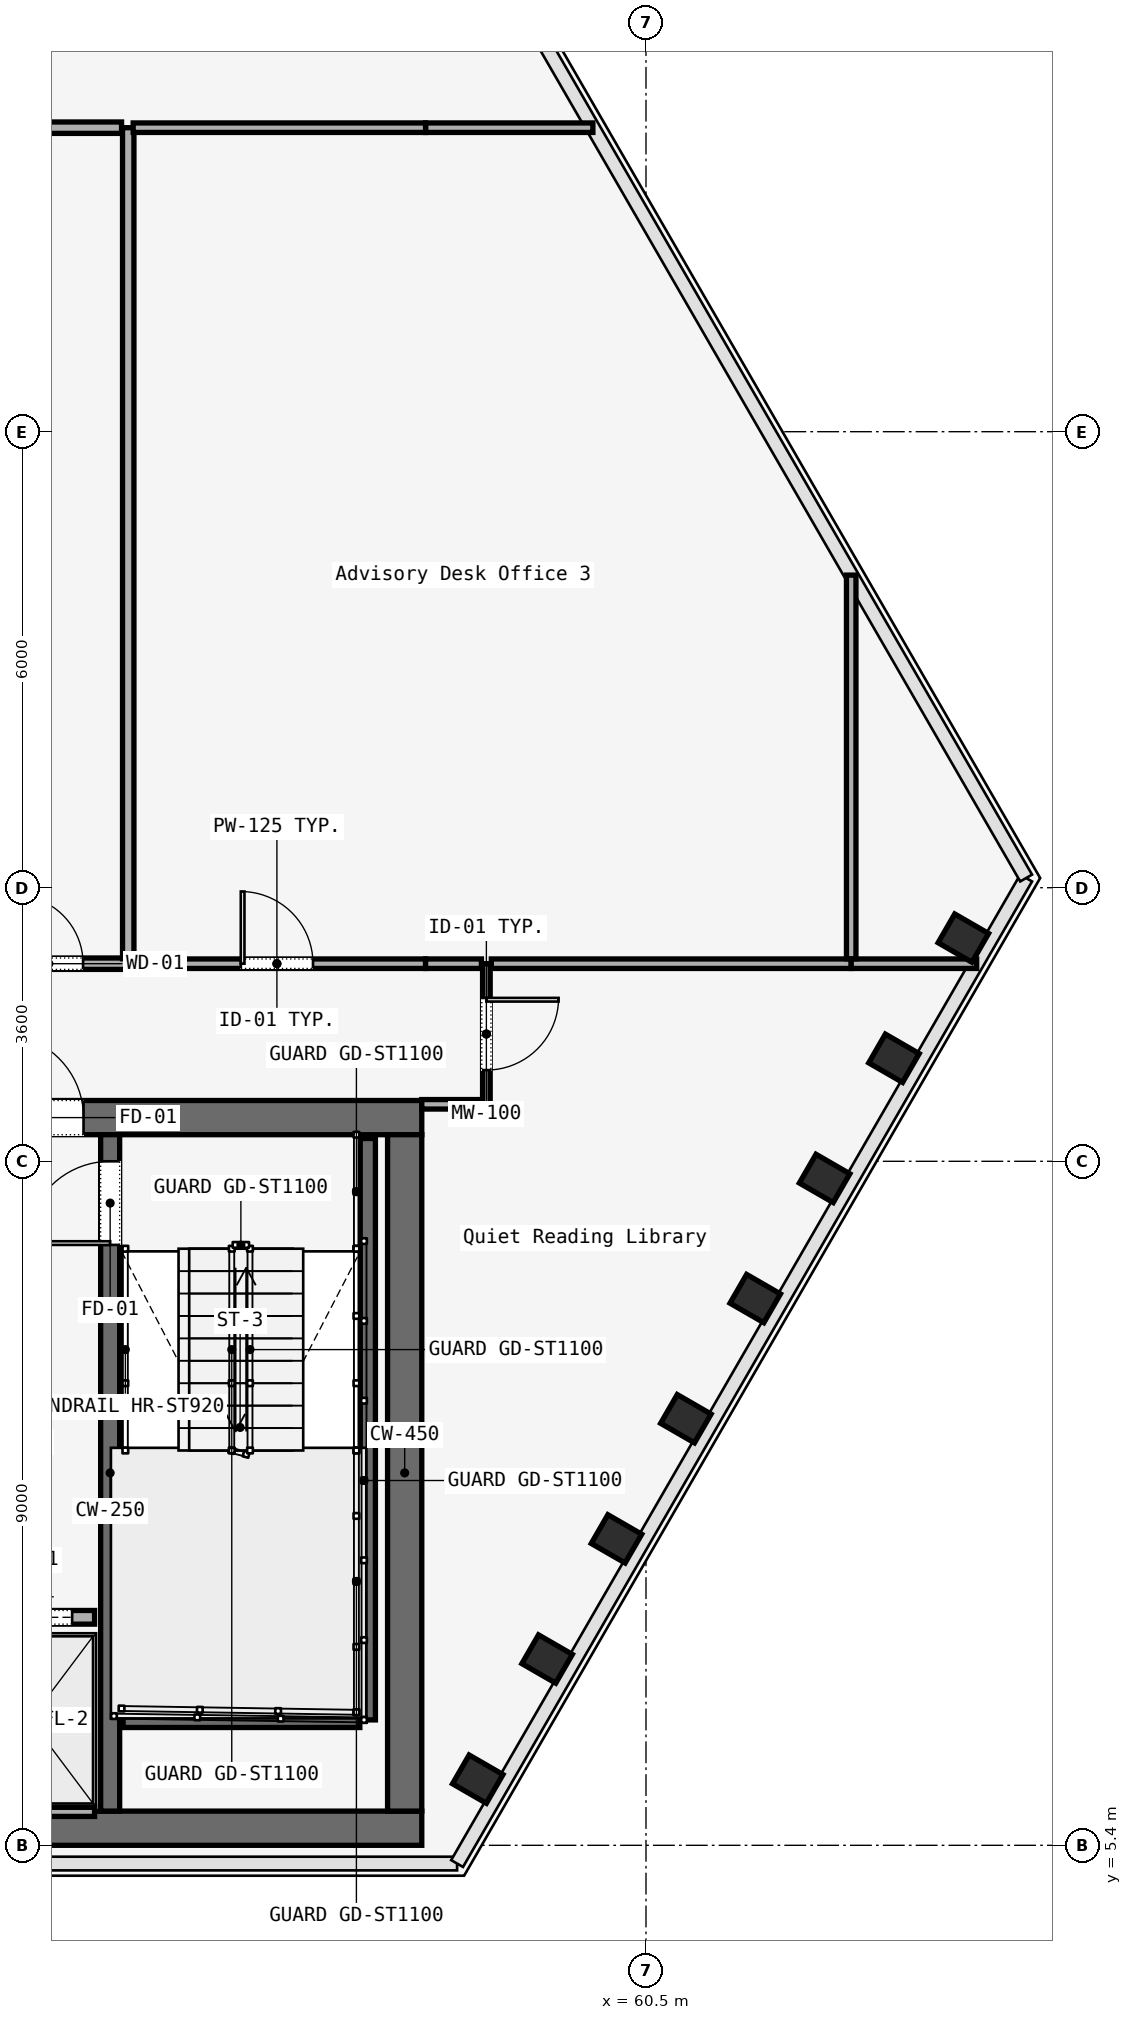
"""IFC4 building model, lengths in metres.
Left out: names, types, materials, properties, quantities, classifications, styles, units other than length and angle.
Written with IfcOpenShell. Run it as: python <this file> out.ifc"""

import sys

from ifc_helpers import new_model, si_unit, direction, frame, frame_2d, origin, origin_2d, place, context, subcontext, project, spatial, rectangle, i_section, extrude, element, fill, save


model = new_model("IFC4")
c1 = context("Model", 3, precision=1e-05, world=origin(), true_north=direction((0.0, 1.0)))
c2 = subcontext(c1, "Body", "Model", "MODEL_VIEW")
j1 = project(units=[si_unit("LENGTHUNIT", "METRE"), si_unit("PLANEANGLEUNIT", "RADIAN")], contexts=[c1])
p1 = place(None, origin())
s1 = spatial("IfcSite", under=j1, at=p1, CompositionType="ELEMENT")
p2 = place(p1, origin())
s2 = spatial("IfcBuilding", under=s1, at=p2, CompositionType="ELEMENT")
p3 = place(p2, frame((0.0, 0.0, 77.8)))
s3 = spatial("IfcBuildingStorey", under=s2, at=p3, CompositionType="ELEMENT", Elevation=77.8)
p4 = place(p3, frame((26.45, 14.975, 0.0), z_axis=(0.0, 0.0, 1.0), x_axis=(1.0, 0.0, 0.0)))
e1 = element("IfcWall", 1, at=p4, inside=s3, PredefinedType="SOLIDWALL", context=c2, shape_type="SweptSolid", body=[
    extrude(rectangle(XDim=31.1, YDim=0.45, at=frame_2d((15.55, 0.0))), origin(), (0.0, 0.0, 1.0), 3.58),
])
p5 = place(p4, frame((1.65, 0.0, 0.0)))
e2 = element("IfcOpeningElement", 2, at=p5, cuts=e1, PredefinedType="OPENING", context=c2, shape_type="SweptSolid", body=[
    extrude(rectangle(XDim=1.1, YDim=2.2, at=frame_2d((0.55, 1.1))), frame((0.0, 0.225, 0.0), z_axis=(0.0, -1.0, 0.0), x_axis=(1.0, 0.0, 0.0)), (0.0, 0.0, 1.0), 0.45),
])
p6 = place(p4, frame((13.65, 0.0, 0.0)))
e3 = element("IfcOpeningElement", 3, at=p6, cuts=e1, PredefinedType="OPENING", context=c2, shape_type="SweptSolid", body=[
    extrude(rectangle(XDim=1.1, YDim=2.2, at=frame_2d((0.55, 1.1))), frame((0.0, 0.225, 0.0), z_axis=(0.0, -1.0, 0.0), x_axis=(1.0, 0.0, 0.0)), (0.0, 0.0, 1.0), 0.45),
])
p7 = place(p4, frame((25.55, 0.0, 0.0)))
e4 = element("IfcOpeningElement", 4, at=p7, cuts=e1, PredefinedType="OPENING", context=c2, shape_type="SweptSolid", body=[
    extrude(rectangle(XDim=1.1, YDim=2.2, at=frame_2d((0.55, 1.1))), frame((0.0, 0.225, 0.0), z_axis=(0.0, -1.0, 0.0), x_axis=(1.0, 0.0, 0.0)), (0.0, 0.0, 1.0), 0.45),
])
p8 = place(p4, frame((10.7, 0.0, 0.0)))
e5 = element("IfcOpeningElement", 5, at=p8, cuts=e1, PredefinedType="OPENING", context=c2, shape_type="SweptSolid", body=[
    extrude(rectangle(XDim=1.4, YDim=2.2, at=frame_2d((0.7, 1.1))), frame((0.0, 0.225, 0.0), z_axis=(0.0, -1.0, 0.0), x_axis=(1.0, 0.0, 0.0)), (0.0, 0.0, 1.0), 0.45),
])
p9 = place(p4, frame((19.35, 0.0, 0.0)))
e6 = element("IfcOpeningElement", 6, at=p9, cuts=e1, PredefinedType="OPENING", context=c2, shape_type="SweptSolid", body=[
    extrude(rectangle(XDim=1.1, YDim=2.2, at=frame_2d((0.55, 1.1))), frame((0.0, 0.225, 0.0), z_axis=(0.0, -1.0, 0.0), x_axis=(1.0, 0.0, 0.0)), (0.0, 0.0, 1.0), 0.45),
])
p10 = place(p4, frame((21.4, 0.0, 0.0)))
e7 = element("IfcOpeningElement", 7, at=p10, cuts=e1, PredefinedType="OPENING", context=c2, shape_type="SweptSolid", body=[
    extrude(rectangle(XDim=0.9, YDim=2.1, at=frame_2d((0.45, 1.05))), frame((0.0, 0.225, 0.0), z_axis=(0.0, -1.0, 0.0), x_axis=(1.0, 0.0, 0.0)), (0.0, 0.0, 1.0), 0.45),
])
p11 = place(p4, frame((23.35, 0.0, 0.0)))
e8 = element("IfcOpeningElement", 8, at=p11, cuts=e1, PredefinedType="OPENING", context=c2, shape_type="SweptSolid", body=[
    extrude(rectangle(XDim=1.3, YDim=2.3, at=frame_2d((0.65, 1.15))), frame((0.0, 0.225, 0.0), z_axis=(0.0, -1.0, 0.0), x_axis=(1.0, 0.0, 0.0)), (0.0, 0.0, 1.0), 0.45),
])
p12 = place(p3, frame((26.45, 5.625, 0.0), z_axis=(0.0, 0.0, 1.0), x_axis=(1.0, 0.0, 0.0)))
e9 = element("IfcWall", 9, at=p12, inside=s3, PredefinedType="SOLIDWALL", context=c2, shape_type="SweptSolid", body=[
    extrude(rectangle(XDim=31.1, YDim=0.45, at=frame_2d((15.55, 0.0))), origin(), (0.0, 0.0, 1.0), 3.58),
])
p13 = place(p3, frame((57.325, 5.85, 0.0), z_axis=(0.0, 0.0, 1.0), x_axis=(0.0, 1.0, 0.0)))
e10 = element("IfcWall", 10, at=p13, inside=s3, PredefinedType="SOLIDWALL", context=c2, shape_type="SweptSolid", body=[
    extrude(rectangle(XDim=8.9, YDim=0.45, at=frame_2d((4.45, 0.0))), origin(), (0.0, 0.0, 1.0), 3.58),
])
p14 = place(p3, frame((53.45, 5.85, 0.0), z_axis=(0.0, 0.0, 1.0), x_axis=(0.0, 1.0, 0.0)))
e11 = element("IfcWall", 11, at=p14, inside=s3, PredefinedType="SOLIDWALL", context=c2, shape_type="SweptSolid", body=[
    extrude(rectangle(XDim=8.9, YDim=0.25, at=frame_2d((4.45, 0.0))), origin(), (0.0, 0.0, 1.0), 3.58),
])
p15 = place(p14, frame((7.45, 0.0, 0.0)))
e12 = element("IfcOpeningElement", 12, at=p15, cuts=e11, PredefinedType="OPENING", context=c2, shape_type="SweptSolid", body=[
    extrude(rectangle(XDim=1.1, YDim=2.2, at=frame_2d((0.55, 1.1))), frame((0.0, 0.125, 0.0), z_axis=(0.0, -1.0, 0.0), x_axis=(1.0, 0.0, 0.0)), (0.0, 0.0, 1.0), 0.25),
])
p16 = place(p3, frame((58.287, 6.271, 0.0), z_axis=(0.077036980807, -0.008363237987, 0.996993159374), x_axis=(-0.804414378603, 0.590266064903, 0.067107973603)))
e13 = element("IfcColumn", 13, at=p16, inside=s3, PredefinedType="COLUMN", context=c2, shape_type="SweptSolid", body=[
    extrude(i_section(OverallWidth=0.437, OverallDepth=0.514, WebThickness=0.061, FlangeThickness=0.077, FilletRadius=0.015, at=origin_2d()), origin(), (0.0, 0.0, 1.0), 3.591),
])
p17 = place(p3, frame((59.199, 7.851, 0.0), z_axis=(0.067477832085, -0.025032098999, 0.99740670551), x_axis=(-0.635947109951, 0.769211528445, 0.062328948751)))
e14 = element("IfcColumn", 14, at=p17, inside=s3, PredefinedType="COLUMN", context=c2, shape_type="SweptSolid", body=[
    extrude(i_section(OverallWidth=0.437, OverallDepth=0.514, WebThickness=0.061, FlangeThickness=0.077, FilletRadius=0.015, at=origin_2d()), origin(), (0.0, 0.0, 1.0), 3.589),
])
p18 = place(p3, frame((60.112, 9.432, 0.0), z_axis=(0.057889342979, -0.041699373967, 0.997451746292), x_axis=(-0.40866877957, 0.910588995233, 0.061786004603)))
e15 = element("IfcColumn", 15, at=p18, inside=s3, PredefinedType="COLUMN", context=c2, shape_type="SweptSolid", body=[
    extrude(i_section(OverallWidth=0.437, OverallDepth=0.514, WebThickness=0.061, FlangeThickness=0.077, FilletRadius=0.015, at=origin_2d()), origin(), (0.0, 0.0, 1.0), 3.589),
])
p19 = place(p3, frame((61.025, 11.013, 0.0), z_axis=(0.048214100692, -0.058414545126, 0.99712744492), x_axis=(-0.164075575958, 0.984264477381, 0.065594542005)))
e16 = element("IfcColumn", 16, at=p19, inside=s3, PredefinedType="COLUMN", context=c2, shape_type="SweptSolid", body=[
    extrude(i_section(OverallWidth=0.437, OverallDepth=0.514, WebThickness=0.061, FlangeThickness=0.077, FilletRadius=0.015, at=origin_2d()), origin(), (0.0, 0.0, 1.0), 3.59),
])
p20 = place(p3, frame((61.938, 12.594, 0.0), z_axis=(0.038463129427, -0.075023489201, 0.996439693982), x_axis=(0.051243793832, 0.996013615068, 0.07301336996)))
e17 = element("IfcColumn", 17, at=p20, inside=s3, PredefinedType="COLUMN", context=c2, shape_type="SweptSolid", body=[
    extrude(i_section(OverallWidth=0.437, OverallDepth=0.514, WebThickness=0.061, FlangeThickness=0.077, FilletRadius=0.015, at=origin_2d()), origin(), (0.0, 0.0, 1.0), 3.593),
])
p21 = place(p3, frame((62.85, 14.175, 0.0), z_axis=(0.02891844144, -0.09157506456, 0.995378185061), x_axis=(0.217209229225, 0.972575677884, 0.083166709256)))
e18 = element("IfcColumn", 18, at=p21, inside=s3, PredefinedType="COLUMN", context=c2, shape_type="SweptSolid", body=[
    extrude(i_section(OverallWidth=0.437, OverallDepth=0.514, WebThickness=0.061, FlangeThickness=0.077, FilletRadius=0.015, at=origin_2d()), origin(), (0.0, 0.0, 1.0), 3.596),
])
p22 = place(p3, frame((63.763, 15.756, 0.0), z_axis=(0.019251328517, -0.108119256986, 0.993951514219), x_axis=(0.341362230089, 0.935107767764, 0.095106732336)))
e19 = element("IfcColumn", 19, at=p22, inside=s3, PredefinedType="COLUMN", context=c2, shape_type="SweptSolid", body=[
    extrude(i_section(OverallWidth=0.437, OverallDepth=0.514, WebThickness=0.061, FlangeThickness=0.077, FilletRadius=0.015, at=origin_2d()), origin(), (0.0, 0.0, 1.0), 3.602),
])
p23 = place(p3, frame((64.676, 17.337, 0.0), z_axis=(0.009608437026, -0.124503691039, 0.992172620493), x_axis=(0.432402826745, 0.895171870126, 0.108143970513)))
e20 = element("IfcColumn", 20, at=p23, inside=s3, PredefinedType="COLUMN", context=c2, shape_type="SweptSolid", body=[
    extrude(i_section(OverallWidth=0.437, OverallDepth=0.514, WebThickness=0.061, FlangeThickness=0.077, FilletRadius=0.015, at=origin_2d()), origin(), (0.0, 0.0, 1.0), 3.608),
])
p24 = place(p3, frame((56.84, 14.7, 0.0), z_axis=(0.0, 0.0, 1.0), x_axis=(0.0, -1.0, 0.0)))
e21 = element("IfcWall", 21, at=p24, inside=s3, PredefinedType="SOLIDWALL", context=c2, shape_type="SweptSolid", body=[
    extrude(rectangle(XDim=7.65, YDim=0.2, at=frame_2d((3.825, 0.0))), origin(), (0.0, 0.0, 1.0), 3.8),
])
p25 = place(p3, frame((53.62, 7.05, 0.0), z_axis=(0.0, 0.0, 1.0), x_axis=(1.0, 0.0, 0.0)))
e22 = element("IfcWall", 22, at=p25, inside=s3, PredefinedType="SOLIDWALL", context=c2, shape_type="SweptSolid", body=[
    extrude(rectangle(XDim=3.115, YDim=0.2, at=frame_2d((1.558, 0.0))), origin(), (0.0, 0.0, 1.0), 3.8),
])
p26 = place(p3, frame((51.555, 8.4, 0.0), z_axis=(0.0, 0.0, 1.0), x_axis=(1.0, 0.0, 0.0)))
e23 = element("IfcWall", 23, at=p26, inside=s3, PredefinedType="SOLIDWALL", context=c2, shape_type="SweptSolid", body=[
    extrude(rectangle(XDim=1.69, YDim=0.18, at=frame_2d((0.845, 0.0))), origin(), (0.0, 0.0, 1.0), 2.95),
])
p27 = place(p26, frame((0.295, 0.0, 0.0)))
e24 = element("IfcOpeningElement", 24, at=p27, cuts=e23, PredefinedType="OPENING", context=c2, shape_type="SweptSolid", body=[
    extrude(rectangle(XDim=1.1, YDim=2.2, at=frame_2d((0.55, 1.1))), frame((0.0, 0.09, 0.0), z_axis=(0.0, -1.0, 0.0), x_axis=(1.0, 0.0, 0.0)), (0.0, 0.0, 1.0), 0.18),
])
p28 = place(p3, frame((51.555, 5.84, 0.0), z_axis=(0.0, 0.0, 1.0), x_axis=(1.0, 0.0, 0.0)))
e25 = element("IfcWall", 25, at=p28, inside=s3, PredefinedType="SOLIDWALL", context=c2, shape_type="SweptSolid", body=[
    extrude(rectangle(XDim=1.69, YDim=0.12, at=frame_2d((0.845, 0.0))), origin(), (0.0, 0.0, 1.0), 2.95),
])
p29 = place(p3, frame((58.4, 17.0, 0.0), z_axis=(0.0, 0.0, 1.0), x_axis=(0.0, -1.0, 0.0)))
e26 = element("IfcWall", 26, at=p29, inside=s3, PredefinedType="MOVABLE", context=c2, shape_type="SweptSolid", body=[
    extrude(rectangle(XDim=1.85, YDim=0.1, at=frame_2d((0.925, 0.0))), origin(), (0.0, 0.0, 1.0), 2.95),
])
p30 = place(p29, frame((0.45, 0.0, 0.0)))
e27 = element("IfcOpeningElement", 27, at=p30, cuts=e26, PredefinedType="OPENING", context=c2, shape_type="SweptSolid", body=[
    extrude(rectangle(XDim=0.95, YDim=2.2, at=frame_2d((0.475, 1.1))), frame((0.0, 0.05, 0.0), z_axis=(0.0, -1.0, 0.0), x_axis=(1.0, 0.0, 0.0)), (0.0, 0.0, 1.0), 0.1),
])
p31 = place(p3, frame((58.335, 15.15, 0.0), z_axis=(0.0, 0.0, 1.0), x_axis=(-1.0, 0.0, 0.0)))
e28 = element("IfcWall", 28, at=p31, inside=s3, PredefinedType="PARTITIONING", context=c2, shape_type="SweptSolid", body=[
    extrude(rectangle(XDim=0.785, YDim=0.125, at=frame_2d((0.393, 0.0))), origin(), (0.0, 0.0, 1.0), 2.95),
])
p32 = place(p3, frame((51.6, 17.0, 0.0), z_axis=(0.0, 0.0, 1.0), x_axis=(1.0, 0.0, 0.0)))
e29 = element("IfcWall", 29, at=p32, inside=s3, PredefinedType="PARTITIONING", context=c2, shape_type="SweptSolid", body=[
    extrude(rectangle(XDim=2.088, YDim=0.15, at=frame_2d((1.044, 0.0))), origin(), (0.0, 0.0, 1.0), 2.95),
])
p33 = place(p32, frame((0.594, 0.0, 0.0)))
e30 = element("IfcOpeningElement", 30, at=p33, cuts=e29, PredefinedType="OPENING", context=c2, shape_type="SweptSolid", body=[
    extrude(rectangle(XDim=0.9, YDim=2.15, at=frame_2d((0.45, 1.075))), frame((0.0, 0.075, 0.0), z_axis=(0.0, -1.0, 0.0), x_axis=(1.0, 0.0, 0.0)), (0.0, 0.0, 1.0), 0.15),
])
p34 = place(p3, frame((53.688, 17.0, 0.0), z_axis=(0.0, 0.0, 1.0), x_axis=(1.0, 0.0, 0.0)))
e31 = element("IfcWall", 31, at=p34, inside=s3, PredefinedType="PARTITIONING", context=c2, shape_type="SweptSolid", body=[
    extrude(rectangle(XDim=3.912, YDim=0.125, at=frame_2d((1.956, 0.0))), origin(), (0.0, 0.0, 1.0), 2.95),
])
p35 = place(p34, frame((1.481, 0.0, 0.0)))
e32 = element("IfcOpeningElement", 32, at=p35, cuts=e31, PredefinedType="OPENING", context=c2, shape_type="SweptSolid", body=[
    extrude(rectangle(XDim=0.95, YDim=2.2, at=frame_2d((0.475, 1.1))), frame((0.0, 0.062, 0.0), z_axis=(0.0, -1.0, 0.0), x_axis=(1.0, 0.0, 0.0)), (0.0, 0.0, 1.0), 0.125),
])
p36 = place(p3, frame((57.6, 17.0, 0.0), z_axis=(0.0, 0.0, 1.0), x_axis=(1.0, 0.0, 0.0)))
e33 = element("IfcWall", 33, at=p36, inside=s3, PredefinedType="PARTITIONING", context=c2, shape_type="SweptSolid", body=[
    extrude(rectangle(XDim=0.735, YDim=0.125, at=frame_2d((0.367, 0.0))), origin(), (0.0, 0.0, 1.0), 2.95),
])
p37 = place(p3, frame((58.465, 17.0, 0.0), z_axis=(0.0, 0.0, 1.0), x_axis=(1.0, 0.0, 0.0)))
e34 = element("IfcWall", 34, at=p37, inside=s3, PredefinedType="PARTITIONING", context=c2, shape_type="SweptSolid", body=[
    extrude(rectangle(XDim=4.735, YDim=0.125, at=frame_2d((2.367, 0.0))), origin(), (0.0, 0.0, 1.0), 2.95),
])
p38 = place(p3, frame((63.2, 17.0, 0.0), z_axis=(0.0, 0.0, 1.0), x_axis=(1.0, 0.0, 0.0)))
e35 = element("IfcWall", 35, at=p38, inside=s3, PredefinedType="PARTITIONING", context=c2, shape_type="SweptSolid", body=[
    extrude(rectangle(XDim=1.651, YDim=0.125, at=frame_2d((0.825, 0.0))), origin(), (0.0, 0.0, 1.0), 2.95),
])
p39 = place(p3, frame((57.6, 28.0, 0.0), z_axis=(0.0, 0.0, 1.0), x_axis=(1.0, 0.0, 0.0)))
e36 = element("IfcWall", 36, at=p39, inside=s3, PredefinedType="PARTITIONING", context=c2, shape_type="SweptSolid", body=[
    extrude(rectangle(XDim=2.201, YDim=0.125, at=frame_2d((1.101, 0.0))), origin(), (0.0, 0.0, 1.0), 2.95),
])
p40 = place(p3, frame((63.2, 22.113, 0.0), z_axis=(0.0, 0.0, 1.0), x_axis=(0.0, -1.0, 0.0)))
e37 = element("IfcWall", 37, at=p40, inside=s3, PredefinedType="PARTITIONING", context=c2, shape_type="SweptSolid", body=[
    extrude(rectangle(XDim=5.048, YDim=0.125, at=frame_2d((2.524, 0.0))), origin(), (0.0, 0.0, 1.0), 2.95),
])
p41 = place(p3, frame((53.688, 17.065, 0.0), z_axis=(0.0, 0.0, 1.0), x_axis=(0.0, 1.0, 0.0)))
e38 = element("IfcWall", 38, at=p41, inside=s3, PredefinedType="PARTITIONING", context=c2, shape_type="SweptSolid", body=[
    extrude(rectangle(XDim=10.935, YDim=0.15, at=frame_2d((5.468, 0.0))), origin(), (0.0, 0.0, 1.0), 2.95),
])
p42 = place(p3, frame((53.753, 28.0, 0.0), z_axis=(0.0, 0.0, 1.0), x_axis=(1.0, 0.0, 0.0)))
e39 = element("IfcWall", 39, at=p42, inside=s3, PredefinedType="PARTITIONING", context=c2, shape_type="SweptSolid", body=[
    extrude(rectangle(XDim=3.847, YDim=0.125, at=frame_2d((1.924, 0.0))), origin(), (0.0, 0.0, 1.0), 2.95),
])
p43 = place(p3, frame((51.6, 28.0, 0.0), z_axis=(0.0, 0.0, 1.0), x_axis=(1.0, 0.0, 0.0)))
e40 = element("IfcWall", 40, at=p43, inside=s3, PredefinedType="PARTITIONING", context=c2, shape_type="SweptSolid", body=[
    extrude(rectangle(XDim=2.0, YDim=0.15, at=frame_2d((1.0, 0.0))), origin(), (0.0, 0.0, 1.0), 2.95),
])
p44 = place(p7, origin())
e41 = element("IfcDoor", 41, at=p44, inside=s3, OperationType="SINGLE_SWING_RIGHT", PredefinedType="DOOR", context=c2, shape_type="SweptSolid", body=[
    extrude(rectangle(XDim=1.1, YDim=2.2, at=frame_2d((0.55, 1.1))), frame((0.0, 0.025, 0.0), z_axis=(0.0, -1.0, 0.0), x_axis=(1.0, 0.0, 0.0)), (0.0, 0.0, 1.0), 0.05),
])
fill(e4, e41)
p45 = place(p15, origin())
e42 = element("IfcDoor", 42, at=p45, inside=s3, OperationType="SINGLE_SWING_LEFT", PredefinedType="DOOR", context=c2, shape_type="SweptSolid", body=[
    extrude(rectangle(XDim=1.1, YDim=2.2, at=frame_2d((0.55, 1.1))), frame((0.0, 0.025, 0.0), z_axis=(0.0, -1.0, 0.0), x_axis=(1.0, 0.0, 0.0)), (0.0, 0.0, 1.0), 0.05),
])
fill(e12, e42)
p46 = place(p27, origin())
e43 = element("IfcDoor", 43, at=p46, inside=s3, OperationType="SLIDING_TO_LEFT", PredefinedType="DOOR", context=c2, shape_type="SweptSolid", body=[
    extrude(rectangle(XDim=1.1, YDim=2.2, at=frame_2d((0.55, 1.1))), frame((0.0, 0.025, 0.0), z_axis=(0.0, -1.0, 0.0), x_axis=(1.0, 0.0, 0.0)), (0.0, 0.0, 1.0), 0.05),
])
fill(e24, e43)
p47 = place(p30, origin())
e44 = element("IfcDoor", 44, at=p47, inside=s3, OperationType="SINGLE_SWING_LEFT", PredefinedType="DOOR", context=c2, shape_type="SweptSolid", body=[
    extrude(rectangle(XDim=0.95, YDim=2.2, at=frame_2d((0.475, 1.1))), frame((0.0, 0.025, 0.0), z_axis=(0.0, -1.0, 0.0), x_axis=(1.0, 0.0, 0.0)), (0.0, 0.0, 1.0), 0.05),
])
fill(e27, e44)
p48 = place(p35, origin())
e45 = element("IfcDoor", 45, at=p48, inside=s3, OperationType="SINGLE_SWING_LEFT", PredefinedType="DOOR", context=c2, shape_type="SweptSolid", body=[
    extrude(rectangle(XDim=0.95, YDim=2.2, at=frame_2d((0.475, 1.1))), frame((0.0, 0.025, 0.0), z_axis=(0.0, -1.0, 0.0), x_axis=(1.0, 0.0, 0.0)), (0.0, 0.0, 1.0), 0.05),
])
fill(e32, e45)
p49 = place(p33, origin())
e46 = element("IfcDoor", 46, at=p49, inside=s3, OperationType="SINGLE_SWING_RIGHT", PredefinedType="DOOR", context=c2, shape_type="SweptSolid", body=[
    extrude(rectangle(XDim=0.9, YDim=2.15, at=frame_2d((0.45, 1.075))), frame((0.0, 0.025, 0.0), z_axis=(0.0, -1.0, 0.0), x_axis=(1.0, 0.0, 0.0)), (0.0, 0.0, 1.0), 0.05),
])
fill(e30, e46)
save(model, sys.argv[1])
